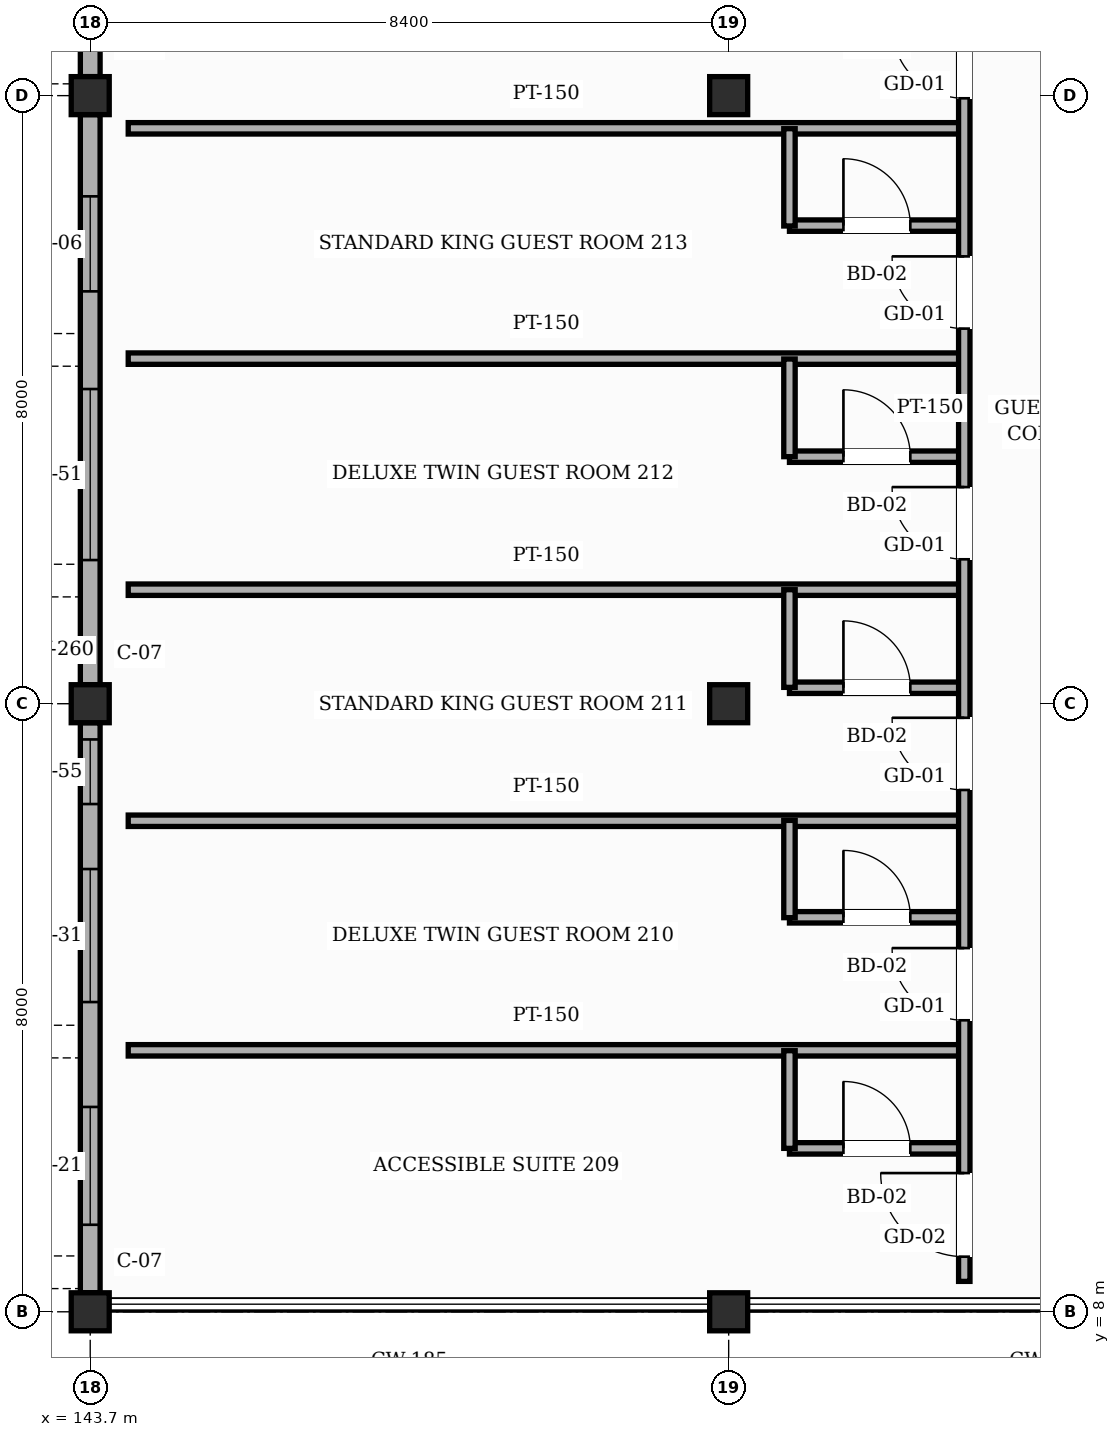
"""IFC4 building model, lengths in metres.
Left out: names, types, materials, properties, quantities, classifications, styles, units other than length and angle.
Written with IfcOpenShell. Run it as: python <this file> out.ifc"""

import sys

from ifc_helpers import new_model, si_unit, direction, frame, frame_2d, origin, origin_2d, place, context, subcontext, project, spatial, rectangle, hollow_rectangle, extrude, element, fill, save


model = new_model("IFC4")
c1 = context("Model", 3, precision=1e-05, world=origin(), true_north=direction((0.0, 1.0)))
c2 = subcontext(c1, "Body", "Model", "MODEL_VIEW")
j1 = project(units=[si_unit("LENGTHUNIT", "METRE"), si_unit("PLANEANGLEUNIT", "RADIAN")], contexts=[c1])
p1 = place(None, origin())
s1 = spatial("IfcSite", under=j1, at=p1, CompositionType="ELEMENT")
p2 = place(p1, origin())
s2 = spatial("IfcBuilding", under=s1, at=p2, CompositionType="ELEMENT")
p3 = place(p2, frame((0.0, 0.0, 35.4)))
s3 = spatial("IfcBuildingStorey", under=s2, at=p3, CompositionType="ELEMENT", Elevation=35.4)
for number, where, z_axis, x_axis in (
    (1, (143.7, 8.0, 0.0), (0.0, 0.0, 1.0), (1.0, 0.0, 0.0)),
    (2, (143.7, 16.0, 0.0), (0.0, 0.0, 1.0), (1.0, 0.0, 0.0)),
    (3, (143.7, 24.0, 0.0), (0.0, 0.0, 1.0), (1.0, 0.0, 0.0)),
    (4, (152.1, 8.0, 0.0), (0.0, 0.0, 1.0), (1.0, 0.0, 0.0)),
    (5, (152.1, 16.0, 0.0), (0.0, 0.0, 1.0), (1.0, 0.0, 0.0)),
    (6, (152.1, 24.0, 0.0), (0.0, 0.0, 1.0), (1.0, 0.0, 0.0)),
):
    element("IfcColumn", number, at=place(p3, frame(where, z_axis=z_axis, x_axis=x_axis)), inside=s3, PredefinedType="COLUMN", context=c2, shape_type="SweptSolid", body=[
        extrude(hollow_rectangle(XDim=0.5, YDim=0.5, WallThickness=0.022, InnerFilletRadius=0.022, OuterFilletRadius=0.044, at=origin_2d()), origin(), (0.0, 0.0, 1.0), 3.6),
    ])
p4 = place(p3, frame((143.7, 8.25, 0.0), z_axis=(0.0, 0.0, 1.0), x_axis=(0.0, 1.0, 0.0)))
e7 = element("IfcWall", 7, at=p4, inside=s3, PredefinedType="SOLIDWALL", context=c2, shape_type="SweptSolid", body=[
    extrude(rectangle(XDim=7.5, YDim=0.26, at=frame_2d((3.75, 0.0))), origin(), (0.0, 0.0, 1.0), 2.805),
])
p5 = place(p4, frame((0.895, 0.0, 0.85)))
e8 = element("IfcOpeningElement", 8, at=p5, cuts=e7, PredefinedType="OPENING", context=c2, shape_type="SweptSolid", body=[
    extrude(rectangle(XDim=1.55, YDim=1.35, at=frame_2d((0.775, 0.675))), frame((0.0, 0.14, 0.0), z_axis=(0.0, -1.0, 0.0), x_axis=(1.0, 0.0, 0.0)), (0.0, 0.0, 1.0), 0.28),
])
p6 = place(p4, frame((3.825, 0.0, 0.85)))
e9 = element("IfcOpeningElement", 9, at=p6, cuts=e7, PredefinedType="OPENING", context=c2, shape_type="SweptSolid", body=[
    extrude(rectangle(XDim=1.75, YDim=1.35, at=frame_2d((0.875, 0.675))), frame((0.0, 0.14, 0.0), z_axis=(0.0, -1.0, 0.0), x_axis=(1.0, 0.0, 0.0)), (0.0, 0.0, 1.0), 0.28),
])
p7 = place(p4, frame((6.43, 0.0, 0.85)))
e10 = element("IfcOpeningElement", 10, at=p7, cuts=e7, PredefinedType="OPENING", context=c2, shape_type="SweptSolid", body=[
    extrude(rectangle(XDim=0.85, YDim=1.35, at=frame_2d((0.425, 0.675))), frame((0.0, 0.14, 0.0), z_axis=(0.0, -1.0, 0.0), x_axis=(1.0, 0.0, 0.0)), (0.0, 0.0, 1.0), 0.28),
])
p8 = place(p3, frame((143.7, 16.25, 0.0), z_axis=(0.0, 0.0, 1.0), x_axis=(0.0, 1.0, 0.0)))
e11 = element("IfcWall", 11, at=p8, inside=s3, PredefinedType="SOLIDWALL", context=c2, shape_type="SweptSolid", body=[
    extrude(rectangle(XDim=7.5, YDim=0.26, at=frame_2d((3.75, 0.0))), origin(), (0.0, 0.0, 1.0), 2.805),
])
p9 = place(p8, frame((1.64, 0.0, 0.85)))
e12 = element("IfcOpeningElement", 12, at=p9, cuts=e11, PredefinedType="OPENING", context=c2, shape_type="SweptSolid", body=[
    extrude(rectangle(XDim=2.25, YDim=1.35, at=frame_2d((1.125, 0.675))), frame((0.0, 0.14, 0.0), z_axis=(0.0, -1.0, 0.0), x_axis=(1.0, 0.0, 0.0)), (0.0, 0.0, 1.0), 0.28),
])
p10 = place(p8, frame((5.175, 0.0, 0.85)))
e13 = element("IfcOpeningElement", 13, at=p10, cuts=e11, PredefinedType="OPENING", context=c2, shape_type="SweptSolid", body=[
    extrude(rectangle(XDim=1.25, YDim=1.35, at=frame_2d((0.625, 0.675))), frame((0.0, 0.14, 0.0), z_axis=(0.0, -1.0, 0.0), x_axis=(1.0, 0.0, 0.0)), (0.0, 0.0, 1.0), 0.28),
])
p11 = place(p3, frame((143.7, 24.25, 0.0), z_axis=(0.0, 0.0, 1.0), x_axis=(0.0, 1.0, 0.0)))
e14 = element("IfcWall", 14, at=p11, inside=s3, PredefinedType="SOLIDWALL", context=c2, shape_type="SweptSolid", body=[
    extrude(rectangle(XDim=2.35, YDim=0.26, at=frame_2d((1.175, 0.0))), origin(), (0.0, 0.0, 1.0), 2.805),
])
p12 = place(p11, frame((0.45, 0.0, 0.85)))
e15 = element("IfcOpeningElement", 15, at=p12, cuts=e14, PredefinedType="OPENING", context=c2, shape_type="SweptSolid", body=[
    extrude(rectangle(XDim=1.45, YDim=1.35, at=frame_2d((0.725, 0.675))), frame((0.0, 0.14, 0.0), z_axis=(0.0, -1.0, 0.0), x_axis=(1.0, 0.0, 0.0)), (0.0, 0.0, 1.0), 0.28),
])
p13 = place(p3, frame((152.9, 10.15, 0.0), z_axis=(0.0, 0.0, 1.0), x_axis=(1.0, 0.0, 0.0)))
e16 = element("IfcWall", 16, at=p13, inside=s3, PredefinedType="PARTITIONING", context=c2, shape_type="SweptSolid", body=[
    extrude(rectangle(XDim=2.3, YDim=0.15, at=frame_2d((1.15, 0.0))), origin(), (0.0, 0.0, 1.0), 3.365),
])
p14 = place(p13, frame((0.71, 0.0, 0.0)))
e17 = element("IfcOpeningElement", 17, at=p14, cuts=e16, PredefinedType="OPENING", context=c2, shape_type="SweptSolid", body=[
    extrude(rectangle(XDim=0.88, YDim=2.12, at=frame_2d((0.44, 1.06))), frame((0.0, 0.085, 0.0), z_axis=(0.0, -1.0, 0.0), x_axis=(1.0, 0.0, 0.0)), (0.0, 0.0, 1.0), 0.17),
])
p15 = place(p3, frame((144.2, 11.44, 0.0), z_axis=(0.0, 0.0, 1.0), x_axis=(1.0, 0.0, 0.0)))
e18 = element("IfcWall", 18, at=p15, inside=s3, PredefinedType="PARTITIONING", context=c2, shape_type="SweptSolid", body=[
    extrude(rectangle(XDim=11.0, YDim=0.15, at=frame_2d((5.5, 0.0))), origin(), (0.0, 0.0, 1.0), 3.365),
])
p16 = place(p3, frame((152.9, 13.19, 0.0), z_axis=(0.0, 0.0, 1.0), x_axis=(1.0, 0.0, 0.0)))
e19 = element("IfcWall", 19, at=p16, inside=s3, PredefinedType="PARTITIONING", context=c2, shape_type="SweptSolid", body=[
    extrude(rectangle(XDim=2.3, YDim=0.15, at=frame_2d((1.15, 0.0))), origin(), (0.0, 0.0, 1.0), 3.365),
])
p17 = place(p16, frame((0.71, 0.0, 0.0)))
e20 = element("IfcOpeningElement", 20, at=p17, cuts=e19, PredefinedType="OPENING", context=c2, shape_type="SweptSolid", body=[
    extrude(rectangle(XDim=0.88, YDim=2.12, at=frame_2d((0.44, 1.06))), frame((0.0, 0.085, 0.0), z_axis=(0.0, -1.0, 0.0), x_axis=(1.0, 0.0, 0.0)), (0.0, 0.0, 1.0), 0.17),
])
p18 = place(p3, frame((144.2, 14.46, 0.0), z_axis=(0.0, 0.0, 1.0), x_axis=(1.0, 0.0, 0.0)))
e21 = element("IfcWall", 21, at=p18, inside=s3, PredefinedType="PARTITIONING", context=c2, shape_type="SweptSolid", body=[
    extrude(rectangle(XDim=11.0, YDim=0.15, at=frame_2d((5.5, 0.0))), origin(), (0.0, 0.0, 1.0), 3.365),
])
p19 = place(p3, frame((152.9, 16.21, 0.0), z_axis=(0.0, 0.0, 1.0), x_axis=(1.0, 0.0, 0.0)))
e22 = element("IfcWall", 22, at=p19, inside=s3, PredefinedType="PARTITIONING", context=c2, shape_type="SweptSolid", body=[
    extrude(rectangle(XDim=2.3, YDim=0.15, at=frame_2d((1.15, 0.0))), origin(), (0.0, 0.0, 1.0), 2.755),
])
p20 = place(p19, frame((0.71, 0.0, 0.0)))
e23 = element("IfcOpeningElement", 23, at=p20, cuts=e22, PredefinedType="OPENING", context=c2, shape_type="SweptSolid", body=[
    extrude(rectangle(XDim=0.88, YDim=2.12, at=frame_2d((0.44, 1.06))), frame((0.0, 0.085, 0.0), z_axis=(0.0, -1.0, 0.0), x_axis=(1.0, 0.0, 0.0)), (0.0, 0.0, 1.0), 0.17),
])
p21 = place(p3, frame((144.2, 17.5, 0.0), z_axis=(0.0, 0.0, 1.0), x_axis=(1.0, 0.0, 0.0)))
e24 = element("IfcWall", 24, at=p21, inside=s3, PredefinedType="PARTITIONING", context=c2, shape_type="SweptSolid", body=[
    extrude(rectangle(XDim=11.0, YDim=0.15, at=frame_2d((5.5, 0.0))), origin(), (0.0, 0.0, 1.0), 3.365),
])
p22 = place(p3, frame((152.9, 19.25, 0.0), z_axis=(0.0, 0.0, 1.0), x_axis=(1.0, 0.0, 0.0)))
e25 = element("IfcWall", 25, at=p22, inside=s3, PredefinedType="PARTITIONING", context=c2, shape_type="SweptSolid", body=[
    extrude(rectangle(XDim=2.3, YDim=0.15, at=frame_2d((1.15, 0.0))), origin(), (0.0, 0.0, 1.0), 3.365),
])
p23 = place(p22, frame((0.71, 0.0, 0.0)))
e26 = element("IfcOpeningElement", 26, at=p23, cuts=e25, PredefinedType="OPENING", context=c2, shape_type="SweptSolid", body=[
    extrude(rectangle(XDim=0.88, YDim=2.12, at=frame_2d((0.44, 1.06))), frame((0.0, 0.085, 0.0), z_axis=(0.0, -1.0, 0.0), x_axis=(1.0, 0.0, 0.0)), (0.0, 0.0, 1.0), 0.17),
])
p24 = place(p3, frame((144.2, 20.54, 0.0), z_axis=(0.0, 0.0, 1.0), x_axis=(1.0, 0.0, 0.0)))
e27 = element("IfcWall", 27, at=p24, inside=s3, PredefinedType="PARTITIONING", context=c2, shape_type="SweptSolid", body=[
    extrude(rectangle(XDim=11.0, YDim=0.15, at=frame_2d((5.5, 0.0))), origin(), (0.0, 0.0, 1.0), 3.365),
])
p25 = place(p3, frame((152.9, 22.29, 0.0), z_axis=(0.0, 0.0, 1.0), x_axis=(1.0, 0.0, 0.0)))
e28 = element("IfcWall", 28, at=p25, inside=s3, PredefinedType="PARTITIONING", context=c2, shape_type="SweptSolid", body=[
    extrude(rectangle(XDim=2.3, YDim=0.15, at=frame_2d((1.15, 0.0))), origin(), (0.0, 0.0, 1.0), 3.365),
])
p26 = place(p25, frame((0.71, 0.0, 0.0)))
e29 = element("IfcOpeningElement", 29, at=p26, cuts=e28, PredefinedType="OPENING", context=c2, shape_type="SweptSolid", body=[
    extrude(rectangle(XDim=0.88, YDim=2.12, at=frame_2d((0.44, 1.06))), frame((0.0, 0.085, 0.0), z_axis=(0.0, -1.0, 0.0), x_axis=(1.0, 0.0, 0.0)), (0.0, 0.0, 1.0), 0.17),
])
p27 = place(p3, frame((144.2, 23.57, 0.0), z_axis=(0.0, 0.0, 1.0), x_axis=(1.0, 0.0, 0.0)))
e30 = element("IfcWall", 30, at=p27, inside=s3, PredefinedType="PARTITIONING", context=c2, shape_type="SweptSolid", body=[
    extrude(rectangle(XDim=11.0, YDim=0.15, at=frame_2d((5.5, 0.0))), origin(), (0.0, 0.0, 1.0), 3.365),
])
p28 = place(p3, frame((152.9, 10.15, 0.0), z_axis=(0.0, 0.0, 1.0), x_axis=(0.0, 1.0, 0.0)))
e31 = element("IfcWall", 31, at=p28, inside=s3, PredefinedType="PARTITIONING", context=c2, shape_type="SweptSolid", body=[
    extrude(rectangle(XDim=1.285, YDim=0.15, at=frame_2d((0.643, 0.0))), origin(), (0.0, 0.0, 1.0), 3.365),
])
p29 = place(p3, frame((152.9, 13.185, 0.0), z_axis=(0.0, 0.0, 1.0), x_axis=(0.0, 1.0, 0.0)))
e32 = element("IfcWall", 32, at=p29, inside=s3, PredefinedType="PARTITIONING", context=c2, shape_type="SweptSolid", body=[
    extrude(rectangle(XDim=1.28, YDim=0.15, at=frame_2d((0.64, 0.0))), origin(), (0.0, 0.0, 1.0), 3.365),
])
for number, where, z_axis, x_axis in (
    (33, (152.9, 16.215, 0.0), (0.0, 0.0, 1.0), (0.0, 1.0, 0.0)),
    (34, (152.9, 19.25, 0.0), (0.0, 0.0, 1.0), (0.0, 1.0, 0.0)),
):
    element("IfcWall", number, at=place(p3, frame(where, z_axis=z_axis, x_axis=x_axis)), inside=s3, PredefinedType="PARTITIONING", context=c2, shape_type="SweptSolid", body=[
        extrude(rectangle(XDim=1.285, YDim=0.15, at=frame_2d((0.643, 0.0))), origin(), (0.0, 0.0, 1.0), 3.365),
    ])
p30 = place(p3, frame((152.9, 22.285, 0.0), z_axis=(0.0, 0.0, 1.0), x_axis=(0.0, 1.0, 0.0)))
e35 = element("IfcWall", 35, at=p30, inside=s3, PredefinedType="PARTITIONING", context=c2, shape_type="SweptSolid", body=[
    extrude(rectangle(XDim=1.28, YDim=0.15, at=frame_2d((0.64, 0.0))), origin(), (0.0, 0.0, 1.0), 3.365),
])
p31 = place(p3, frame((155.2, 8.4, 0.0), z_axis=(0.0, 0.0, 1.0), x_axis=(0.0, 1.0, 0.0)))
e36 = element("IfcWall", 36, at=p31, inside=s3, PredefinedType="PARTITIONING", context=c2, shape_type="SweptSolid", body=[
    extrude(rectangle(XDim=18.2, YDim=0.15, at=frame_2d((9.1, 0.0))), origin(), (0.0, 0.0, 1.0), 3.365),
])
p32 = place(p31, frame((0.325, 0.0, 0.0)))
e37 = element("IfcOpeningElement", 37, at=p32, cuts=e36, PredefinedType="OPENING", context=c2, shape_type="SweptSolid", body=[
    extrude(rectangle(XDim=1.1, YDim=2.2, at=frame_2d((0.55, 1.1))), frame((0.0, 0.085, 0.0), z_axis=(0.0, -1.0, 0.0), x_axis=(1.0, 0.0, 0.0)), (0.0, 0.0, 1.0), 0.17),
])
p33 = place(p31, frame((3.435, 0.0, 0.0)))
e38 = element("IfcOpeningElement", 38, at=p33, cuts=e36, PredefinedType="OPENING", context=c2, shape_type="SweptSolid", body=[
    extrude(rectangle(XDim=0.95, YDim=2.15, at=frame_2d((0.475, 1.075))), frame((0.0, 0.085, 0.0), z_axis=(0.0, -1.0, 0.0), x_axis=(1.0, 0.0, 0.0)), (0.0, 0.0, 1.0), 0.17),
])
p34 = place(p31, frame((6.465, 0.0, 0.0)))
e39 = element("IfcOpeningElement", 39, at=p34, cuts=e36, PredefinedType="OPENING", context=c2, shape_type="SweptSolid", body=[
    extrude(rectangle(XDim=0.95, YDim=2.15, at=frame_2d((0.475, 1.075))), frame((0.0, 0.085, 0.0), z_axis=(0.0, -1.0, 0.0), x_axis=(1.0, 0.0, 0.0)), (0.0, 0.0, 1.0), 0.17),
])
p35 = place(p31, frame((9.5, 0.0, 0.0)))
e40 = element("IfcOpeningElement", 40, at=p35, cuts=e36, PredefinedType="OPENING", context=c2, shape_type="SweptSolid", body=[
    extrude(rectangle(XDim=0.95, YDim=2.15, at=frame_2d((0.475, 1.075))), frame((0.0, 0.085, 0.0), z_axis=(0.0, -1.0, 0.0), x_axis=(1.0, 0.0, 0.0)), (0.0, 0.0, 1.0), 0.17),
])
p36 = place(p31, frame((12.535, 0.0, 0.0)))
e41 = element("IfcOpeningElement", 41, at=p36, cuts=e36, PredefinedType="OPENING", context=c2, shape_type="SweptSolid", body=[
    extrude(rectangle(XDim=0.95, YDim=2.15, at=frame_2d((0.475, 1.075))), frame((0.0, 0.085, 0.0), z_axis=(0.0, -1.0, 0.0), x_axis=(1.0, 0.0, 0.0)), (0.0, 0.0, 1.0), 0.17),
])
p37 = place(p31, frame((15.565, 0.0, 0.0)))
e42 = element("IfcOpeningElement", 42, at=p37, cuts=e36, PredefinedType="OPENING", context=c2, shape_type="SweptSolid", body=[
    extrude(rectangle(XDim=0.95, YDim=2.15, at=frame_2d((0.475, 1.075))), frame((0.0, 0.085, 0.0), z_axis=(0.0, -1.0, 0.0), x_axis=(1.0, 0.0, 0.0)), (0.0, 0.0, 1.0), 0.17),
])
p38 = place(p5, origin())
e43 = element("IfcWindow", 43, at=p38, inside=s3, PartitioningType="SINGLE_PANEL", PredefinedType="WINDOW", context=c2, shape_type="SweptSolid", body=[
    extrude(rectangle(XDim=1.55, YDim=1.35, at=frame_2d((0.775, 0.675))), frame((0.0, 0.03, 0.0), z_axis=(0.0, -1.0, 0.0), x_axis=(1.0, 0.0, 0.0)), (0.0, 0.0, 1.0), 0.06),
])
fill(e8, e43)
p39 = place(p6, origin())
e44 = element("IfcWindow", 44, at=p39, inside=s3, PartitioningType="SINGLE_PANEL", PredefinedType="WINDOW", context=c2, shape_type="SweptSolid", body=[
    extrude(rectangle(XDim=1.75, YDim=1.35, at=frame_2d((0.875, 0.675))), frame((0.0, 0.03, 0.0), z_axis=(0.0, -1.0, 0.0), x_axis=(1.0, 0.0, 0.0)), (0.0, 0.0, 1.0), 0.06),
])
fill(e9, e44)
p40 = place(p7, origin())
e45 = element("IfcWindow", 45, at=p40, inside=s3, PartitioningType="SINGLE_PANEL", PredefinedType="WINDOW", context=c2, shape_type="SweptSolid", body=[
    extrude(rectangle(XDim=0.85, YDim=1.35, at=frame_2d((0.425, 0.675))), frame((0.0, 0.03, 0.0), z_axis=(0.0, -1.0, 0.0), x_axis=(1.0, 0.0, 0.0)), (0.0, 0.0, 1.0), 0.06),
])
fill(e10, e45)
p41 = place(p9, origin())
e46 = element("IfcWindow", 46, at=p41, inside=s3, PartitioningType="SINGLE_PANEL", PredefinedType="WINDOW", context=c2, shape_type="SweptSolid", body=[
    extrude(rectangle(XDim=2.25, YDim=1.35, at=frame_2d((1.125, 0.675))), frame((0.0, 0.03, 0.0), z_axis=(0.0, -1.0, 0.0), x_axis=(1.0, 0.0, 0.0)), (0.0, 0.0, 1.0), 0.06),
])
fill(e12, e46)
p42 = place(p10, origin())
e47 = element("IfcWindow", 47, at=p42, inside=s3, PartitioningType="SINGLE_PANEL", PredefinedType="WINDOW", context=c2, shape_type="SweptSolid", body=[
    extrude(rectangle(XDim=1.25, YDim=1.35, at=frame_2d((0.625, 0.675))), frame((0.0, 0.03, 0.0), z_axis=(0.0, -1.0, 0.0), x_axis=(1.0, 0.0, 0.0)), (0.0, 0.0, 1.0), 0.06),
])
fill(e13, e47)
p43 = place(p32, origin())
e48 = element("IfcDoor", 48, at=p43, inside=s3, OperationType="SINGLE_SWING_RIGHT", PredefinedType="DOOR", context=c2, shape_type="SweptSolid", body=[
    extrude(rectangle(XDim=1.1, YDim=2.2, at=frame_2d((0.55, 1.1))), frame((0.0, 0.025, 0.0), z_axis=(0.0, -1.0, 0.0), x_axis=(1.0, 0.0, 0.0)), (0.0, 0.0, 1.0), 0.05),
])
fill(e37, e48)
p44 = place(p14, origin())
e49 = element("IfcDoor", 49, at=p44, inside=s3, OperationType="SINGLE_SWING_LEFT", PredefinedType="DOOR", context=c2, shape_type="SweptSolid", body=[
    extrude(rectangle(XDim=0.88, YDim=2.12, at=frame_2d((0.44, 1.06))), frame((0.0, 0.025, 0.0), z_axis=(0.0, -1.0, 0.0), x_axis=(1.0, 0.0, 0.0)), (0.0, 0.0, 1.0), 0.05),
])
fill(e17, e49)
p45 = place(p33, origin())
e50 = element("IfcDoor", 50, at=p45, inside=s3, OperationType="SINGLE_SWING_RIGHT", PredefinedType="DOOR", context=c2, shape_type="SweptSolid", body=[
    extrude(rectangle(XDim=0.95, YDim=2.15, at=frame_2d((0.475, 1.075))), frame((0.0, 0.025, 0.0), z_axis=(0.0, -1.0, 0.0), x_axis=(1.0, 0.0, 0.0)), (0.0, 0.0, 1.0), 0.05),
])
fill(e38, e50)
p46 = place(p17, origin())
e51 = element("IfcDoor", 51, at=p46, inside=s3, OperationType="SINGLE_SWING_LEFT", PredefinedType="DOOR", context=c2, shape_type="SweptSolid", body=[
    extrude(rectangle(XDim=0.88, YDim=2.12, at=frame_2d((0.44, 1.06))), frame((0.0, 0.025, 0.0), z_axis=(0.0, -1.0, 0.0), x_axis=(1.0, 0.0, 0.0)), (0.0, 0.0, 1.0), 0.05),
])
fill(e20, e51)
p47 = place(p34, origin())
e52 = element("IfcDoor", 52, at=p47, inside=s3, OperationType="SINGLE_SWING_RIGHT", PredefinedType="DOOR", context=c2, shape_type="SweptSolid", body=[
    extrude(rectangle(XDim=0.95, YDim=2.15, at=frame_2d((0.475, 1.075))), frame((0.0, 0.025, 0.0), z_axis=(0.0, -1.0, 0.0), x_axis=(1.0, 0.0, 0.0)), (0.0, 0.0, 1.0), 0.05),
])
fill(e39, e52)
p48 = place(p20, origin())
e53 = element("IfcDoor", 53, at=p48, inside=s3, OperationType="SINGLE_SWING_LEFT", PredefinedType="DOOR", context=c2, shape_type="SweptSolid", body=[
    extrude(rectangle(XDim=0.88, YDim=2.12, at=frame_2d((0.44, 1.06))), frame((0.0, 0.025, 0.0), z_axis=(0.0, -1.0, 0.0), x_axis=(1.0, 0.0, 0.0)), (0.0, 0.0, 1.0), 0.05),
])
fill(e23, e53)
p49 = place(p35, origin())
e54 = element("IfcDoor", 54, at=p49, inside=s3, OperationType="SINGLE_SWING_RIGHT", PredefinedType="DOOR", context=c2, shape_type="SweptSolid", body=[
    extrude(rectangle(XDim=0.95, YDim=2.15, at=frame_2d((0.475, 1.075))), frame((0.0, 0.025, 0.0), z_axis=(0.0, -1.0, 0.0), x_axis=(1.0, 0.0, 0.0)), (0.0, 0.0, 1.0), 0.05),
])
fill(e40, e54)
p50 = place(p23, origin())
e55 = element("IfcDoor", 55, at=p50, inside=s3, OperationType="SINGLE_SWING_LEFT", PredefinedType="DOOR", context=c2, shape_type="SweptSolid", body=[
    extrude(rectangle(XDim=0.88, YDim=2.12, at=frame_2d((0.44, 1.06))), frame((0.0, 0.025, 0.0), z_axis=(0.0, -1.0, 0.0), x_axis=(1.0, 0.0, 0.0)), (0.0, 0.0, 1.0), 0.05),
])
fill(e26, e55)
p51 = place(p36, origin())
e56 = element("IfcDoor", 56, at=p51, inside=s3, OperationType="SINGLE_SWING_RIGHT", PredefinedType="DOOR", context=c2, shape_type="SweptSolid", body=[
    extrude(rectangle(XDim=0.95, YDim=2.15, at=frame_2d((0.475, 1.075))), frame((0.0, 0.025, 0.0), z_axis=(0.0, -1.0, 0.0), x_axis=(1.0, 0.0, 0.0)), (0.0, 0.0, 1.0), 0.05),
])
fill(e41, e56)
p52 = place(p26, origin())
e57 = element("IfcDoor", 57, at=p52, inside=s3, OperationType="SINGLE_SWING_LEFT", PredefinedType="DOOR", context=c2, shape_type="SweptSolid", body=[
    extrude(rectangle(XDim=0.88, YDim=2.12, at=frame_2d((0.44, 1.06))), frame((0.0, 0.025, 0.0), z_axis=(0.0, -1.0, 0.0), x_axis=(1.0, 0.0, 0.0)), (0.0, 0.0, 1.0), 0.05),
])
fill(e29, e57)
p53 = place(p37, origin())
e58 = element("IfcDoor", 58, at=p53, inside=s3, OperationType="SINGLE_SWING_RIGHT", PredefinedType="DOOR", context=c2, shape_type="SweptSolid", body=[
    extrude(rectangle(XDim=0.95, YDim=2.15, at=frame_2d((0.475, 1.075))), frame((0.0, 0.025, 0.0), z_axis=(0.0, -1.0, 0.0), x_axis=(1.0, 0.0, 0.0)), (0.0, 0.0, 1.0), 0.05),
])
fill(e42, e58)
save(model, sys.argv[1])
